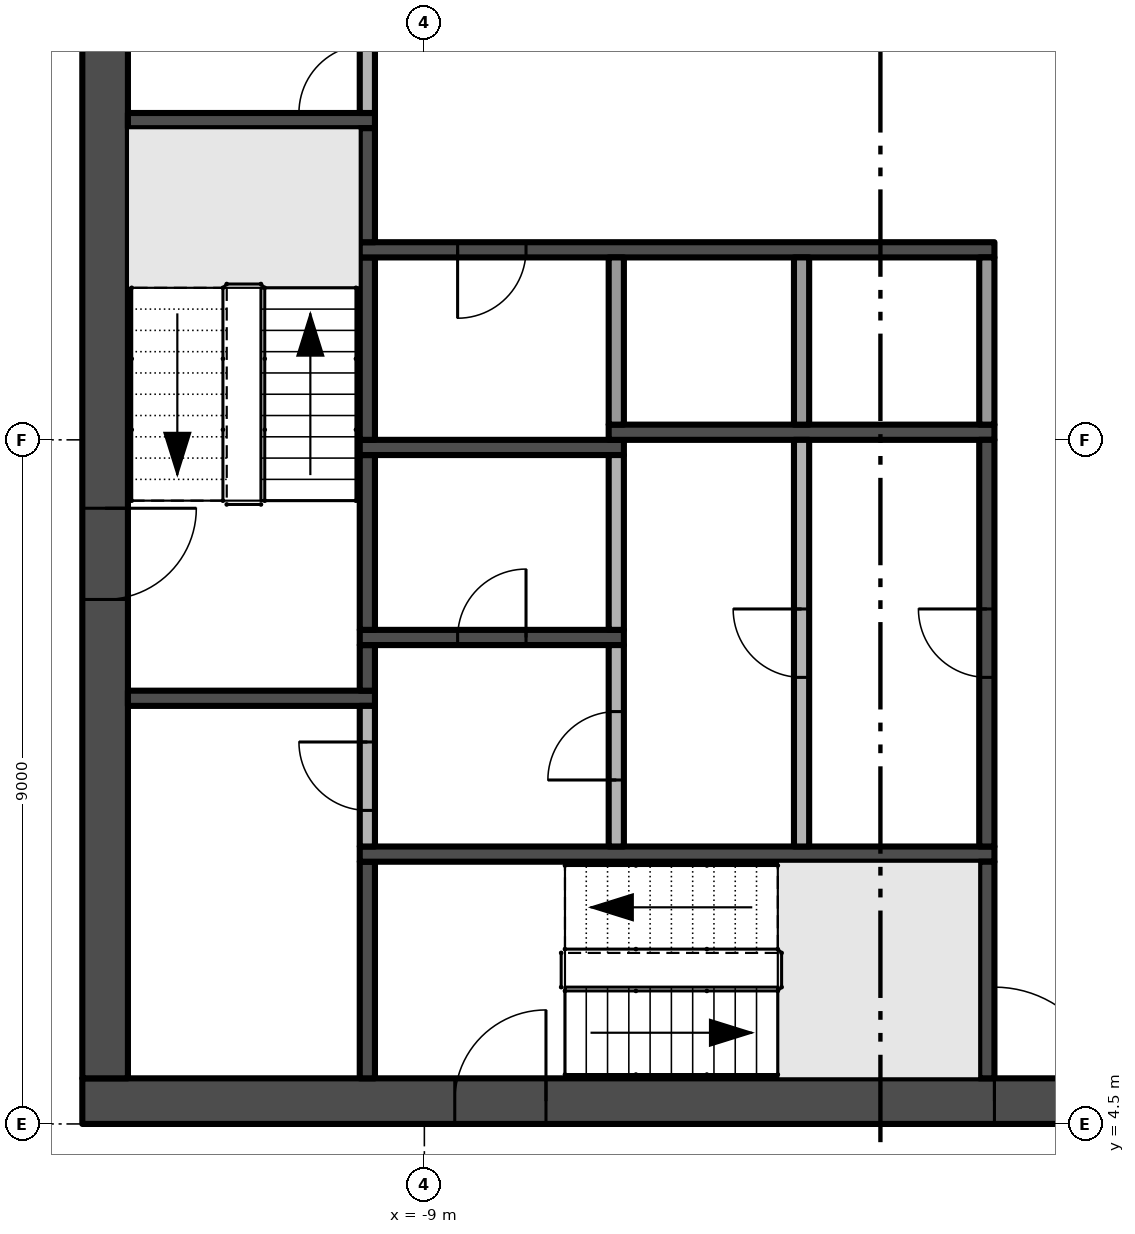
"""IFC4 building model, lengths in metres.
Left out: names, types, materials, properties, quantities, classifications, styles, units other than length and angle.
Written with IfcOpenShell. Run it as: python <this file> out.ifc"""

import sys

from ifc_helpers import new_model, si_unit, direction, frame, frame_2d, origin, place, context, subcontext, project, spatial, rectangle, extrude, element, fill, save


model = new_model("IFC4")
c1 = context("Model", 3, precision=1e-05, world=origin(), true_north=direction((0.0, 1.0)))
c2 = subcontext(c1, "Body", "Model", "MODEL_VIEW")
j1 = project(units=[si_unit("LENGTHUNIT", "METRE"), si_unit("PLANEANGLEUNIT", "RADIAN")], contexts=[c1])
p1 = place(None, origin())
s1 = spatial("IfcSite", under=j1, at=p1, CompositionType="ELEMENT")
p2 = place(p1, origin())
s2 = spatial("IfcBuilding", under=s1, at=p2, CompositionType="ELEMENT")
p3 = place(p2, frame((0.0, 0.0, 242.6)))
s3 = spatial("IfcBuildingStorey", under=s2, at=p3, CompositionType="ELEMENT", Elevation=242.6)
p4 = place(p3, frame((-13.5, 4.8, -0.3), z_axis=(0.0, 0.0, 1.0), x_axis=(1.0, 0.0, 0.0)))
e1 = element("IfcWall", 1, at=p4, inside=s3, PredefinedType="SHEAR", context=c2, shape_type="SweptSolid", body=[
    extrude(rectangle(XDim=27.0, YDim=0.6, at=frame_2d((13.5, 0.0))), origin(), (0.0, 0.0, 1.0), 3.8),
])
p5 = place(p4, frame((12.0, 0.0, 0.3)))
e2 = element("IfcOpeningElement", 2, at=p5, cuts=e1, PredefinedType="OPENING", context=c2, shape_type="SweptSolid", body=[
    extrude(rectangle(XDim=3.0, YDim=2.4, at=frame_2d((1.5, 1.2))), frame((0.0, 0.31, 0.0), z_axis=(0.0, -1.0, 0.0), x_axis=(1.0, 0.0, 0.0)), (0.0, 0.0, 1.0), 0.62),
])
p6 = place(p4, frame((4.9, 0.0, 0.3)))
e3 = element("IfcOpeningElement", 3, at=p6, cuts=e1, PredefinedType="OPENING", context=c2, shape_type="SweptSolid", body=[
    extrude(rectangle(XDim=1.2, YDim=2.2, at=frame_2d((0.6, 1.1))), frame((0.0, 0.31, 0.0), z_axis=(0.0, -1.0, 0.0), x_axis=(1.0, 0.0, 0.0)), (0.0, 0.0, 1.0), 0.62),
])
p7 = place(p4, frame((20.75, 0.0, 0.3)))
e4 = element("IfcOpeningElement", 4, at=p7, cuts=e1, PredefinedType="OPENING", context=c2, shape_type="SweptSolid", body=[
    extrude(rectangle(XDim=1.5, YDim=2.2, at=frame_2d((0.75, 1.1))), frame((0.0, 0.31, 0.0), z_axis=(0.0, -1.0, 0.0), x_axis=(1.0, 0.0, 0.0)), (0.0, 0.0, 1.0), 0.62),
])
p8 = place(p4, frame((17.4, 0.0, 0.3)))
e5 = element("IfcOpeningElement", 5, at=p8, cuts=e1, PredefinedType="OPENING", context=c2, shape_type="SweptSolid", body=[
    extrude(rectangle(XDim=1.2, YDim=2.2, at=frame_2d((0.6, 1.1))), frame((0.0, 0.31, 0.0), z_axis=(0.0, -1.0, 0.0), x_axis=(1.0, 0.0, 0.0)), (0.0, 0.0, 1.0), 0.62),
])
p9 = place(p3, frame((-13.2, 21.9, -0.3), z_axis=(0.0, 0.0, 1.0), x_axis=(0.0, -1.0, 0.0)))
e6 = element("IfcWall", 6, at=p9, inside=s3, PredefinedType="SHEAR", context=c2, shape_type="SweptSolid", body=[
    extrude(rectangle(XDim=16.8, YDim=0.6, at=frame_2d((8.4, 0.0))), origin(), (0.0, 0.0, 1.0), 3.8),
])
p10 = place(p9, frame((9.3, 0.0, 0.3)))
e7 = element("IfcOpeningElement", 7, at=p10, cuts=e6, PredefinedType="OPENING", context=c2, shape_type="SweptSolid", body=[
    extrude(rectangle(XDim=1.2, YDim=2.2, at=frame_2d((0.6, 1.1))), frame((0.0, 0.31, 0.0), z_axis=(0.0, -1.0, 0.0), x_axis=(1.0, 0.0, 0.0)), (0.0, 0.0, 1.0), 0.62),
])
for number, where, z_axis, x_axis in (
    (8, (-12.9, 10.1, 0.0), (0.0, 0.0, 1.0), (1.0, 0.0, 0.0)),
    (9, (-12.9, 17.7, 0.0), (0.0, 0.0, 1.0), (1.0, 0.0, 0.0)),
):
    element("IfcWall", number, at=place(p3, frame(where, z_axis=z_axis, x_axis=x_axis)), inside=s3, PredefinedType="SHEAR", context=c2, shape_type="SweptSolid", body=[
        extrude(rectangle(XDim=3.25, YDim=0.2, at=frame_2d((1.625, 0.0))), origin(), (0.0, 0.0, 1.0), 3.5),
    ])
p11 = place(p3, frame((-9.75, 5.1, 0.0), z_axis=(0.0, 0.0, 1.0), x_axis=(0.0, 1.0, 0.0)))
e10 = element("IfcWall", 10, at=p11, inside=s3, PredefinedType="SHEAR", context=c2, shape_type="SweptSolid", body=[
    extrude(rectangle(XDim=2.85, YDim=0.2, at=frame_2d((1.425, 0.0))), origin(), (0.0, 0.0, 1.0), 3.5),
])
p12 = place(p3, frame((-9.85, 8.05, 0.0), z_axis=(0.0, 0.0, 1.0), x_axis=(1.0, 0.0, 0.0)))
e11 = element("IfcWall", 11, at=p12, inside=s3, PredefinedType="SHEAR", context=c2, shape_type="SweptSolid", body=[
    extrude(rectangle(XDim=8.35, YDim=0.2, at=frame_2d((4.175, 0.0))), origin(), (0.0, 0.0, 1.0), 3.5),
])
p13 = place(p3, frame((-9.75, 8.15, 0.0), z_axis=(0.0, 0.0, 1.0), x_axis=(0.0, 1.0, 0.0)))
e12 = element("IfcWall", 12, at=p13, inside=s3, PredefinedType="PARTITIONING", context=c2, shape_type="SweptSolid", body=[
    extrude(rectangle(XDim=1.85, YDim=0.2, at=frame_2d((0.925, 0.0))), origin(), (0.0, 0.0, 1.0), 3.5),
])
p14 = place(p13, frame((0.475, 0.0, 0.0)))
e13 = element("IfcOpeningElement", 13, at=p14, cuts=e12, PredefinedType="OPENING", context=c2, shape_type="SweptSolid", body=[
    extrude(rectangle(XDim=0.9, YDim=2.1, at=frame_2d((0.45, 1.05))), frame((0.0, 0.11, 0.0), z_axis=(0.0, -1.0, 0.0), x_axis=(1.0, 0.0, 0.0)), (0.0, 0.0, 1.0), 0.22),
])
p15 = place(p3, frame((-9.75, 10.2, 0.0), z_axis=(0.0, 0.0, 1.0), x_axis=(0.0, 1.0, 0.0)))
e14 = element("IfcWall", 14, at=p15, inside=s3, PredefinedType="SHEAR", context=c2, shape_type="SweptSolid", body=[
    extrude(rectangle(XDim=0.6, YDim=0.2, at=frame_2d((0.3, 0.0))), origin(), (0.0, 0.0, 1.0), 3.5),
])
p16 = place(p3, frame((-9.85, 10.9, 0.0), z_axis=(0.0, 0.0, 1.0), x_axis=(1.0, 0.0, 0.0)))
e15 = element("IfcWall", 15, at=p16, inside=s3, PredefinedType="SHEAR", context=c2, shape_type="SweptSolid", body=[
    extrude(rectangle(XDim=3.475, YDim=0.2, at=frame_2d((1.738, 0.0))), origin(), (0.0, 0.0, 1.0), 3.5),
])
p17 = place(p16, frame((1.288, 0.0, 0.0)))
e16 = element("IfcOpeningElement", 16, at=p17, cuts=e15, PredefinedType="OPENING", context=c2, shape_type="SweptSolid", body=[
    extrude(rectangle(XDim=0.9, YDim=2.1, at=frame_2d((0.45, 1.05))), frame((0.0, 0.11, 0.0), z_axis=(0.0, -1.0, 0.0), x_axis=(1.0, 0.0, 0.0)), (0.0, 0.0, 1.0), 0.22),
])
p18 = place(p3, frame((-9.75, 11.0, 0.0), z_axis=(0.0, 0.0, 1.0), x_axis=(0.0, 1.0, 0.0)))
e17 = element("IfcWall", 17, at=p18, inside=s3, PredefinedType="SHEAR", context=c2, shape_type="SweptSolid", body=[
    extrude(rectangle(XDim=2.3, YDim=0.2, at=frame_2d((1.15, 0.0))), origin(), (0.0, 0.0, 1.0), 3.5),
])
p19 = place(p3, frame((-9.85, 13.4, 0.0), z_axis=(0.0, 0.0, 1.0), x_axis=(1.0, 0.0, 0.0)))
e18 = element("IfcWall", 18, at=p19, inside=s3, PredefinedType="SHEAR", context=c2, shape_type="SweptSolid", body=[
    extrude(rectangle(XDim=3.475, YDim=0.2, at=frame_2d((1.738, 0.0))), origin(), (0.0, 0.0, 1.0), 3.5),
])
p20 = place(p3, frame((-9.75, 13.5, 0.0), z_axis=(0.0, 0.0, 1.0), x_axis=(0.0, 1.0, 0.0)))
e19 = element("IfcWall", 19, at=p20, inside=s3, PredefinedType="SHEAR", context=c2, shape_type="SweptSolid", body=[
    extrude(rectangle(XDim=2.4, YDim=0.2, at=frame_2d((1.2, 0.0))), origin(), (0.0, 0.0, 1.0), 3.5),
])
p21 = place(p3, frame((-1.5, 16.0, 0.0), z_axis=(0.0, 0.0, 1.0), x_axis=(-1.0, 0.0, 0.0)))
e20 = element("IfcWall", 20, at=p21, inside=s3, PredefinedType="SHEAR", context=c2, shape_type="SweptSolid", body=[
    extrude(rectangle(XDim=8.35, YDim=0.2, at=frame_2d((4.175, 0.0))), origin(), (0.0, 0.0, 1.0), 3.5),
])
p22 = place(p21, frame((6.162, 0.0, 0.0)))
e21 = element("IfcOpeningElement", 21, at=p22, cuts=e20, PredefinedType="OPENING", context=c2, shape_type="SweptSolid", body=[
    extrude(rectangle(XDim=0.9, YDim=2.1, at=frame_2d((0.45, 1.05))), frame((0.0, 0.11, 0.0), z_axis=(0.0, -1.0, 0.0), x_axis=(1.0, 0.0, 0.0)), (0.0, 0.0, 1.0), 0.22),
])
p23 = place(p3, frame((-9.75, 16.1, 0.0), z_axis=(0.0, 0.0, 1.0), x_axis=(0.0, 1.0, 0.0)))
e22 = element("IfcWall", 22, at=p23, inside=s3, PredefinedType="SHEAR", context=c2, shape_type="SweptSolid", body=[
    extrude(rectangle(XDim=1.5, YDim=0.2, at=frame_2d((0.75, 0.0))), origin(), (0.0, 0.0, 1.0), 3.5),
])
p24 = place(p3, frame((-9.75, 17.8, 0.0), z_axis=(0.0, 0.0, 1.0), x_axis=(0.0, 1.0, 0.0)))
e23 = element("IfcWall", 23, at=p24, inside=s3, PredefinedType="PARTITIONING", context=c2, shape_type="SweptSolid", body=[
    extrude(rectangle(XDim=1.4, YDim=0.2, at=frame_2d((0.7, 0.0))), origin(), (0.0, 0.0, 1.0), 3.5),
])
p25 = place(p24, origin())
e24 = element("IfcOpeningElement", 24, at=p25, cuts=e23, PredefinedType="OPENING", context=c2, shape_type="SweptSolid", body=[
    extrude(rectangle(XDim=0.9, YDim=2.1, at=frame_2d((0.45, 1.05))), frame((0.0, 0.11, 0.0), z_axis=(0.0, -1.0, 0.0), x_axis=(1.0, 0.0, 0.0)), (0.0, 0.0, 1.0), 0.22),
])
p26 = place(p3, frame((-6.475, 8.15, 0.0), z_axis=(0.0, 0.0, 1.0), x_axis=(0.0, 1.0, 0.0)))
e25 = element("IfcWall", 25, at=p26, inside=s3, PredefinedType="PARTITIONING", context=c2, shape_type="SweptSolid", body=[
    extrude(rectangle(XDim=2.65, YDim=0.2, at=frame_2d((1.325, 0.0))), origin(), (0.0, 0.0, 1.0), 3.5),
])
p27 = place(p26, frame((0.875, 0.0, 0.0)))
e26 = element("IfcOpeningElement", 26, at=p27, cuts=e25, PredefinedType="OPENING", context=c2, shape_type="SweptSolid", body=[
    extrude(rectangle(XDim=0.9, YDim=2.1, at=frame_2d((0.45, 1.05))), frame((0.0, 0.11, 0.0), z_axis=(0.0, -1.0, 0.0), x_axis=(1.0, 0.0, 0.0)), (0.0, 0.0, 1.0), 0.22),
])
p28 = place(p3, frame((-6.475, 11.0, 0.0), z_axis=(0.0, 0.0, 1.0), x_axis=(0.0, 1.0, 0.0)))
e27 = element("IfcWall", 27, at=p28, inside=s3, PredefinedType="PARTITIONING", context=c2, shape_type="SweptSolid", body=[
    extrude(rectangle(XDim=2.3, YDim=0.2, at=frame_2d((1.15, 0.0))), origin(), (0.0, 0.0, 1.0), 3.5),
])
p29 = place(p3, frame((-6.575, 13.6, 0.0), z_axis=(0.0, 0.0, 1.0), x_axis=(1.0, 0.0, 0.0)))
e28 = element("IfcWall", 28, at=p29, inside=s3, PredefinedType="SHEAR", context=c2, shape_type="SweptSolid", body=[
    extrude(rectangle(XDim=5.075, YDim=0.2, at=frame_2d((2.538, 0.0))), origin(), (0.0, 0.0, 1.0), 3.5),
])
p30 = place(p3, frame((-6.475, 13.7, 0.0), z_axis=(0.0, 0.0, 1.0), x_axis=(0.0, 1.0, 0.0)))
e29 = element("IfcWall", 29, at=p30, inside=s3, PredefinedType="PARTITIONING", context=c2, shape_type="SweptSolid", body=[
    extrude(rectangle(XDim=2.2, YDim=0.2, at=frame_2d((1.1, 0.0))), origin(), (0.0, 0.0, 1.0), 3.5),
])
p31 = place(p3, frame((-4.037, 8.15, 0.0), z_axis=(0.0, 0.0, 1.0), x_axis=(0.0, 1.0, 0.0)))
e30 = element("IfcWall", 30, at=p31, inside=s3, PredefinedType="PARTITIONING", context=c2, shape_type="SweptSolid", body=[
    extrude(rectangle(XDim=5.35, YDim=0.2, at=frame_2d((2.675, 0.0))), origin(), (0.0, 0.0, 1.0), 3.5),
])
p32 = place(p31, frame((2.225, 0.0, 0.0)))
e31 = element("IfcOpeningElement", 31, at=p32, cuts=e30, PredefinedType="OPENING", context=c2, shape_type="SweptSolid", body=[
    extrude(rectangle(XDim=0.9, YDim=2.1, at=frame_2d((0.45, 1.05))), frame((0.0, 0.11, 0.0), z_axis=(0.0, -1.0, 0.0), x_axis=(1.0, 0.0, 0.0)), (0.0, 0.0, 1.0), 0.22),
])
p33 = place(p3, frame((-4.037, 13.7, 0.0), z_axis=(0.0, 0.0, 1.0), x_axis=(0.0, 1.0, 0.0)))
e32 = element("IfcWall", 32, at=p33, inside=s3, PredefinedType="PARTITIONING", context=c2, shape_type="SweptSolid", body=[
    extrude(rectangle(XDim=2.2, YDim=0.2, at=frame_2d((1.1, 0.0))), origin(), (0.0, 0.0, 1.0), 3.5),
])
p34 = place(p3, frame((-1.6, 5.1, 0.0), z_axis=(0.0, 0.0, 1.0), x_axis=(0.0, 1.0, 0.0)))
e33 = element("IfcWall", 33, at=p34, inside=s3, PredefinedType="SHEAR", context=c2, shape_type="SweptSolid", body=[
    extrude(rectangle(XDim=2.85, YDim=0.2, at=frame_2d((1.425, 0.0))), origin(), (0.0, 0.0, 1.0), 3.5),
])
p35 = place(p3, frame((-1.6, 8.15, 0.0), z_axis=(0.0, 0.0, 1.0), x_axis=(0.0, 1.0, 0.0)))
e34 = element("IfcWall", 34, at=p35, inside=s3, PredefinedType="SHEAR", context=c2, shape_type="SweptSolid", body=[
    extrude(rectangle(XDim=5.35, YDim=0.2, at=frame_2d((2.675, 0.0))), origin(), (0.0, 0.0, 1.0), 3.5),
])
p36 = place(p35, frame((2.225, 0.0, 0.0)))
e35 = element("IfcOpeningElement", 35, at=p36, cuts=e34, PredefinedType="OPENING", context=c2, shape_type="SweptSolid", body=[
    extrude(rectangle(XDim=0.9, YDim=2.1, at=frame_2d((0.45, 1.05))), frame((0.0, 0.11, 0.0), z_axis=(0.0, -1.0, 0.0), x_axis=(1.0, 0.0, 0.0)), (0.0, 0.0, 1.0), 0.22),
])
p37 = place(p3, frame((-1.6, 13.7, 0.0), z_axis=(0.0, 0.0, 1.0), x_axis=(0.0, 1.0, 0.0)))
e36 = element("IfcWall", 36, at=p37, inside=s3, PredefinedType="PARTITIONING", context=c2, shape_type="SweptSolid", body=[
    extrude(rectangle(XDim=2.2, YDim=0.2, at=frame_2d((1.1, 0.0))), origin(), (0.0, 0.0, 1.0), 3.5),
])
p38 = place(p5, frame((3.0, 0.0, 0.0), z_axis=(0.0, 0.0, 1.0), x_axis=(-1.0, 0.0, 0.0)))
e37 = element("IfcDoor", 37, at=p38, inside=s3, OperationType="DOUBLE_DOOR_SINGLE_SWING", PredefinedType="DOOR", context=c2, shape_type="SweptSolid", body=[
    extrude(rectangle(XDim=3.0, YDim=2.4, at=frame_2d((1.5, 1.2))), frame((0.0, 0.025, 0.0), z_axis=(0.0, -1.0, 0.0), x_axis=(1.0, 0.0, 0.0)), (0.0, 0.0, 1.0), 0.05),
])
fill(e2, e37)
p39 = place(p10, frame((1.2, 0.0, 0.0), z_axis=(0.0, 0.0, 1.0), x_axis=(-1.0, 0.0, 0.0)))
e38 = element("IfcDoor", 38, at=p39, inside=s3, OperationType="SINGLE_SWING_RIGHT", PredefinedType="DOOR", context=c2, shape_type="SweptSolid", body=[
    extrude(rectangle(XDim=1.2, YDim=2.2, at=frame_2d((0.6, 1.1))), frame((0.0, 0.025, 0.0), z_axis=(0.0, -1.0, 0.0), x_axis=(1.0, 0.0, 0.0)), (0.0, 0.0, 1.0), 0.05),
])
fill(e7, e38)
p40 = place(p6, frame((1.2, 0.0, 0.0), z_axis=(0.0, 0.0, 1.0), x_axis=(-1.0, 0.0, 0.0)))
e39 = element("IfcDoor", 39, at=p40, inside=s3, OperationType="SINGLE_SWING_LEFT", PredefinedType="DOOR", context=c2, shape_type="SweptSolid", body=[
    extrude(rectangle(XDim=1.2, YDim=2.2, at=frame_2d((0.6, 1.1))), frame((0.0, 0.025, 0.0), z_axis=(0.0, -1.0, 0.0), x_axis=(1.0, 0.0, 0.0)), (0.0, 0.0, 1.0), 0.05),
])
fill(e3, e39)
p41 = place(p22, origin())
e40 = element("IfcDoor", 40, at=p41, inside=s3, OperationType="SINGLE_SWING_RIGHT", PredefinedType="DOOR", context=c2, shape_type="SweptSolid", body=[
    extrude(rectangle(XDim=0.9, YDim=2.1, at=frame_2d((0.45, 1.05))), frame((0.0, 0.025, 0.0), z_axis=(0.0, -1.0, 0.0), x_axis=(1.0, 0.0, 0.0)), (0.0, 0.0, 1.0), 0.05),
])
fill(e21, e40)
p42 = place(p36, origin())
e41 = element("IfcDoor", 41, at=p42, inside=s3, OperationType="SINGLE_SWING_RIGHT", PredefinedType="DOOR", context=c2, shape_type="SweptSolid", body=[
    extrude(rectangle(XDim=0.9, YDim=2.1, at=frame_2d((0.45, 1.05))), frame((0.0, 0.025, 0.0), z_axis=(0.0, -1.0, 0.0), x_axis=(1.0, 0.0, 0.0)), (0.0, 0.0, 1.0), 0.05),
])
fill(e35, e41)
p43 = place(p25, origin())
e42 = element("IfcDoor", 42, at=p43, inside=s3, OperationType="SINGLE_SWING_LEFT", PredefinedType="DOOR", context=c2, shape_type="SweptSolid", body=[
    extrude(rectangle(XDim=0.9, YDim=2.1, at=frame_2d((0.45, 1.05))), frame((0.0, 0.025, 0.0), z_axis=(0.0, -1.0, 0.0), x_axis=(1.0, 0.0, 0.0)), (0.0, 0.0, 1.0), 0.05),
])
fill(e24, e42)
p44 = place(p32, origin())
e43 = element("IfcDoor", 43, at=p44, inside=s3, OperationType="SINGLE_SWING_RIGHT", PredefinedType="DOOR", context=c2, shape_type="SweptSolid", body=[
    extrude(rectangle(XDim=0.9, YDim=2.1, at=frame_2d((0.45, 1.05))), frame((0.0, 0.025, 0.0), z_axis=(0.0, -1.0, 0.0), x_axis=(1.0, 0.0, 0.0)), (0.0, 0.0, 1.0), 0.05),
])
fill(e31, e43)
p45 = place(p27, origin())
e44 = element("IfcDoor", 44, at=p45, inside=s3, OperationType="SINGLE_SWING_LEFT", PredefinedType="DOOR", context=c2, shape_type="SweptSolid", body=[
    extrude(rectangle(XDim=0.9, YDim=2.1, at=frame_2d((0.45, 1.05))), frame((0.0, 0.025, 0.0), z_axis=(0.0, -1.0, 0.0), x_axis=(1.0, 0.0, 0.0)), (0.0, 0.0, 1.0), 0.05),
])
fill(e26, e44)
p46 = place(p17, origin())
e45 = element("IfcDoor", 45, at=p46, inside=s3, OperationType="SINGLE_SWING_RIGHT", PredefinedType="DOOR", context=c2, shape_type="SweptSolid", body=[
    extrude(rectangle(XDim=0.9, YDim=2.1, at=frame_2d((0.45, 1.05))), frame((0.0, 0.025, 0.0), z_axis=(0.0, -1.0, 0.0), x_axis=(1.0, 0.0, 0.0)), (0.0, 0.0, 1.0), 0.05),
])
fill(e16, e45)
p47 = place(p14, origin())
e46 = element("IfcDoor", 46, at=p47, inside=s3, OperationType="SINGLE_SWING_RIGHT", PredefinedType="DOOR", context=c2, shape_type="SweptSolid", body=[
    extrude(rectangle(XDim=0.9, YDim=2.1, at=frame_2d((0.45, 1.05))), frame((0.0, 0.025, 0.0), z_axis=(0.0, -1.0, 0.0), x_axis=(1.0, 0.0, 0.0)), (0.0, 0.0, 1.0), 0.05),
])
fill(e13, e46)
save(model, sys.argv[1])
